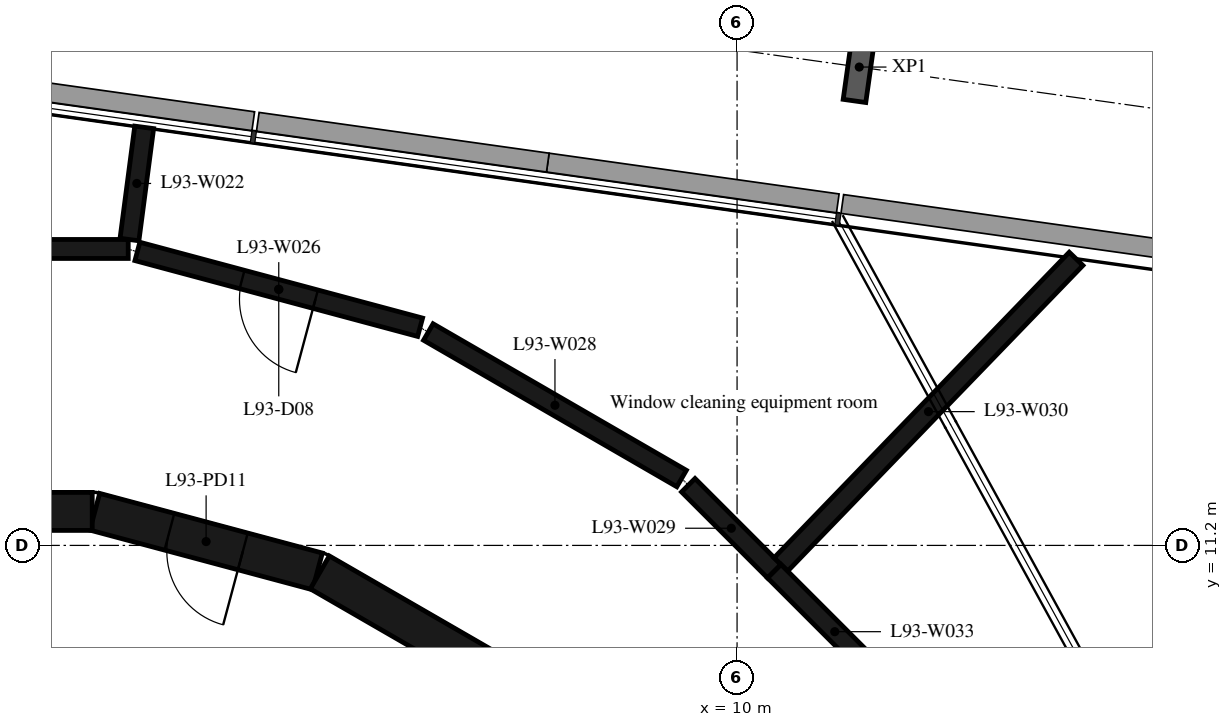
"""IFC4 building model, lengths in metres.
Left out: names, types, materials, properties, quantities, classifications, styles, units other than length and angle.
Written with IfcOpenShell. Run it as: python <this file> out.ifc"""

import sys

from ifc_helpers import new_model, si_unit, direction, frame, frame_2d, origin, origin_2d, place, context, subcontext, project, spatial, rectangle, i_section, extrude, element, fill, save


model = new_model("IFC4")
c1 = context("Model", 3, precision=1e-05, world=origin(), true_north=direction((0.0, 1.0)))
c2 = subcontext(c1, "Body", "Model", "MODEL_VIEW")
j1 = project(units=[si_unit("LENGTHUNIT", "METRE"), si_unit("PLANEANGLEUNIT", "RADIAN")], contexts=[c1])
p1 = place(None, origin())
s1 = spatial("IfcSite", under=j1, at=p1, CompositionType="ELEMENT")
p2 = place(p1, origin())
s2 = spatial("IfcBuilding", under=s1, at=p2, CompositionType="ELEMENT")
p3 = place(p2, frame((0.0, 0.0, 361.0)))
s3 = spatial("IfcBuildingStorey", under=s2, at=p3, CompositionType="ELEMENT", Elevation=361.0)
p4 = place(p3, frame((11.607, 17.493, -0.38), z_axis=(0.0, 0.0, 1.0), x_axis=(0.990268081324, -0.139173011432, 0.0)))
e1 = element("IfcColumn", 1, at=p4, inside=s3, PredefinedType="COLUMN", context=c2, shape_type="SweptSolid", body=[
    extrude(i_section(OverallWidth=0.3, OverallDepth=0.9, WebThickness=0.019, FlangeThickness=0.035, FilletRadius=0.03, at=origin_2d()), origin(), (0.0, 0.0, 1.0), 5.2),
])
p5 = place(p3, frame((7.137, 9.329, 0.0), z_axis=(0.0, 0.0, 1.0), x_axis=(-0.865975092491, 0.500087131594, 0.0)))
e2 = element("IfcWall", 2, at=p5, inside=s3, PredefinedType="SHEAR", context=c2, shape_type="SweptSolid", body=[
    extrude(rectangle(XDim=3.033, YDim=0.5, at=frame_2d((1.516, 0.0))), origin(), (0.0, 0.0, 1.0), 4.82),
])
p6 = place(p3, frame((4.479, 10.858, 0.0), z_axis=(0.0, 0.0, 1.0), x_axis=(-0.965948410781, 0.258734743916, 0.0)))
e3 = element("IfcWall", 3, at=p6, inside=s3, PredefinedType="SHEAR", context=c2, shape_type="SweptSolid", body=[
    extrude(rectangle(XDim=3.033, YDim=0.5, at=frame_2d((1.516, 0.0))), origin(), (0.0, 0.0, 1.0), 4.82),
])
p7 = place(p6, frame((1.016, 0.0, 0.0)))
e4 = element("IfcOpeningElement", 4, at=p7, cuts=e3, PredefinedType="OPENING", context=c2, shape_type="SweptSolid", body=[
    extrude(rectangle(XDim=1.0, YDim=2.4, at=frame_2d((0.5, 1.2))), frame((0.0, 0.26, 0.0), z_axis=(0.0, -1.0, 0.0), x_axis=(1.0, 0.0, 0.0)), (0.0, 0.0, 1.0), 0.52),
])
p8 = place(p3, frame((1.516, 11.647, 0.0), z_axis=(0.0, 0.0, 1.0), x_axis=(-1.0, 0.0, 0.0)))
e5 = element("IfcWall", 5, at=p8, inside=s3, PredefinedType="SHEAR", context=c2, shape_type="SweptSolid", body=[
    extrude(rectangle(XDim=3.033, YDim=0.5, at=frame_2d((1.516, 0.0))), origin(), (0.0, 0.0, 1.0), 4.82),
])
p9 = place(p3, frame((1.99, 15.1, 0.0), z_axis=(0.0, 0.0, 1.0), x_axis=(-1.0, 0.0, 0.0)))
e6 = element("IfcWall", 6, at=p9, inside=s3, PredefinedType="PARTITIONING", context=c2, shape_type="SweptSolid", body=[
    extrude(rectangle(XDim=3.855, YDim=0.25, at=frame_2d((1.927, 0.0))), origin(), (0.0, 0.0, 1.0), 4.82),
])
p10 = place(p9, frame((1.427, 0.0, 0.0)))
e7 = element("IfcOpeningElement", 7, at=p10, cuts=e6, PredefinedType="OPENING", context=c2, shape_type="SweptSolid", body=[
    extrude(rectangle(XDim=1.0, YDim=2.1, at=frame_2d((0.5, 1.05))), frame((0.0, 0.135, 0.0), z_axis=(0.0, -1.0, 0.0), x_axis=(1.0, 0.0, 0.0)), (0.0, 0.0, 1.0), 0.27),
])
p11 = place(p3, frame((2.006, 15.224, 0.0), z_axis=(0.0, 0.0, 1.0), x_axis=(0.13004725163, 0.991507797419, 0.0)))
e8 = element("IfcWall", 8, at=p11, inside=s3, PredefinedType="PARTITIONING", context=c2, shape_type="SweptSolid", body=[
    extrude(rectangle(XDim=1.489, YDim=0.25, at=frame_2d((0.744, 0.0))), origin(), (0.0, 0.0, 1.0), 4.82),
])
p12 = place(p3, frame((5.83, 14.07, 0.0), z_axis=(0.0, 0.0, 1.0), x_axis=(-0.965861411942, 0.259059323171, 0.0)))
e9 = element("IfcWall", 9, at=p12, inside=s3, PredefinedType="PARTITIONING", context=c2, shape_type="SweptSolid", body=[
    extrude(rectangle(XDim=3.851, YDim=0.25, at=frame_2d((1.925, 0.0))), origin(), (0.0, 0.0, 1.0), 4.82),
])
p13 = place(p12, frame((1.425, 0.0, 0.0)))
e10 = element("IfcOpeningElement", 10, at=p13, cuts=e9, PredefinedType="OPENING", context=c2, shape_type="SweptSolid", body=[
    extrude(rectangle(XDim=1.0, YDim=2.1, at=frame_2d((0.5, 1.05))), frame((0.0, 0.135, 0.0), z_axis=(0.0, -1.0, 0.0), x_axis=(1.0, 0.0, 0.0)), (0.0, 0.0, 1.0), 0.27),
])
p14 = place(p3, frame((9.27, 12.08, 0.0), z_axis=(0.0, 0.0, 1.0), x_axis=(-0.865615852585, 0.500708693508, 0.0)))
e11 = element("IfcWall", 11, at=p14, inside=s3, PredefinedType="PARTITIONING", context=c2, shape_type="SweptSolid", body=[
    extrude(rectangle(XDim=3.849, YDim=0.25, at=frame_2d((1.925, 0.0))), origin(), (0.0, 0.0, 1.0), 4.82),
])
p15 = place(p3, frame((10.49, 10.86, 0.0), z_axis=(0.0, 0.0, 1.0), x_axis=(-0.707106781187, 0.707106781187, 0.0)))
e12 = element("IfcWall", 12, at=p15, inside=s3, PredefinedType="PARTITIONING", context=c2, shape_type="SweptSolid", body=[
    extrude(rectangle(XDim=1.6, YDim=0.25, at=frame_2d((0.8, 0.0))), origin(), (0.0, 0.0, 1.0), 4.82),
])
p16 = place(p3, frame((10.577, 10.95, 0.0), z_axis=(0.0, 0.0, 1.0), x_axis=(0.694748067219, 0.719253170376, 0.0)))
e13 = element("IfcWall", 13, at=p16, inside=s3, PredefinedType="PARTITIONING", context=c2, shape_type="SweptSolid", body=[
    extrude(rectangle(XDim=5.589, YDim=0.25, at=frame_2d((2.794, 0.0))), origin(), (0.0, 0.0, 1.0), 4.82),
])
p17 = place(p3, frame((12.08, 9.27, 0.0), z_axis=(0.0, 0.0, 1.0), x_axis=(-0.707106781187, 0.707106781187, 0.0)))
e14 = element("IfcWall", 14, at=p17, inside=s3, PredefinedType="PARTITIONING", context=c2, shape_type="SweptSolid", body=[
    extrude(rectangle(XDim=2.249, YDim=0.25, at=frame_2d((1.125, 0.0))), origin(), (0.0, 0.0, 1.0), 4.82),
])
p18 = place(p7, origin())
e15 = element("IfcDoor", 15, at=p18, inside=s3, OperationType="SINGLE_SWING_RIGHT", PredefinedType="DOOR", context=c2, shape_type="SweptSolid", body=[
    extrude(rectangle(XDim=1.0, YDim=2.4, at=frame_2d((0.5, 1.2))), frame((0.0, 0.025, 0.0), z_axis=(0.0, -1.0, 0.0), x_axis=(1.0, 0.0, 0.0)), (0.0, 0.0, 1.0), 0.05),
])
fill(e4, e15)
p19 = place(p13, origin())
e16 = element("IfcDoor", 16, at=p19, inside=s3, OperationType="SINGLE_SWING_LEFT", PredefinedType="DOOR", context=c2, shape_type="SweptSolid", body=[
    extrude(rectangle(XDim=1.0, YDim=2.1, at=frame_2d((0.5, 1.05))), frame((0.0, 0.025, 0.0), z_axis=(0.0, -1.0, 0.0), x_axis=(1.0, 0.0, 0.0)), (0.0, 0.0, 1.0), 0.05),
])
fill(e10, e16)
save(model, sys.argv[1])
